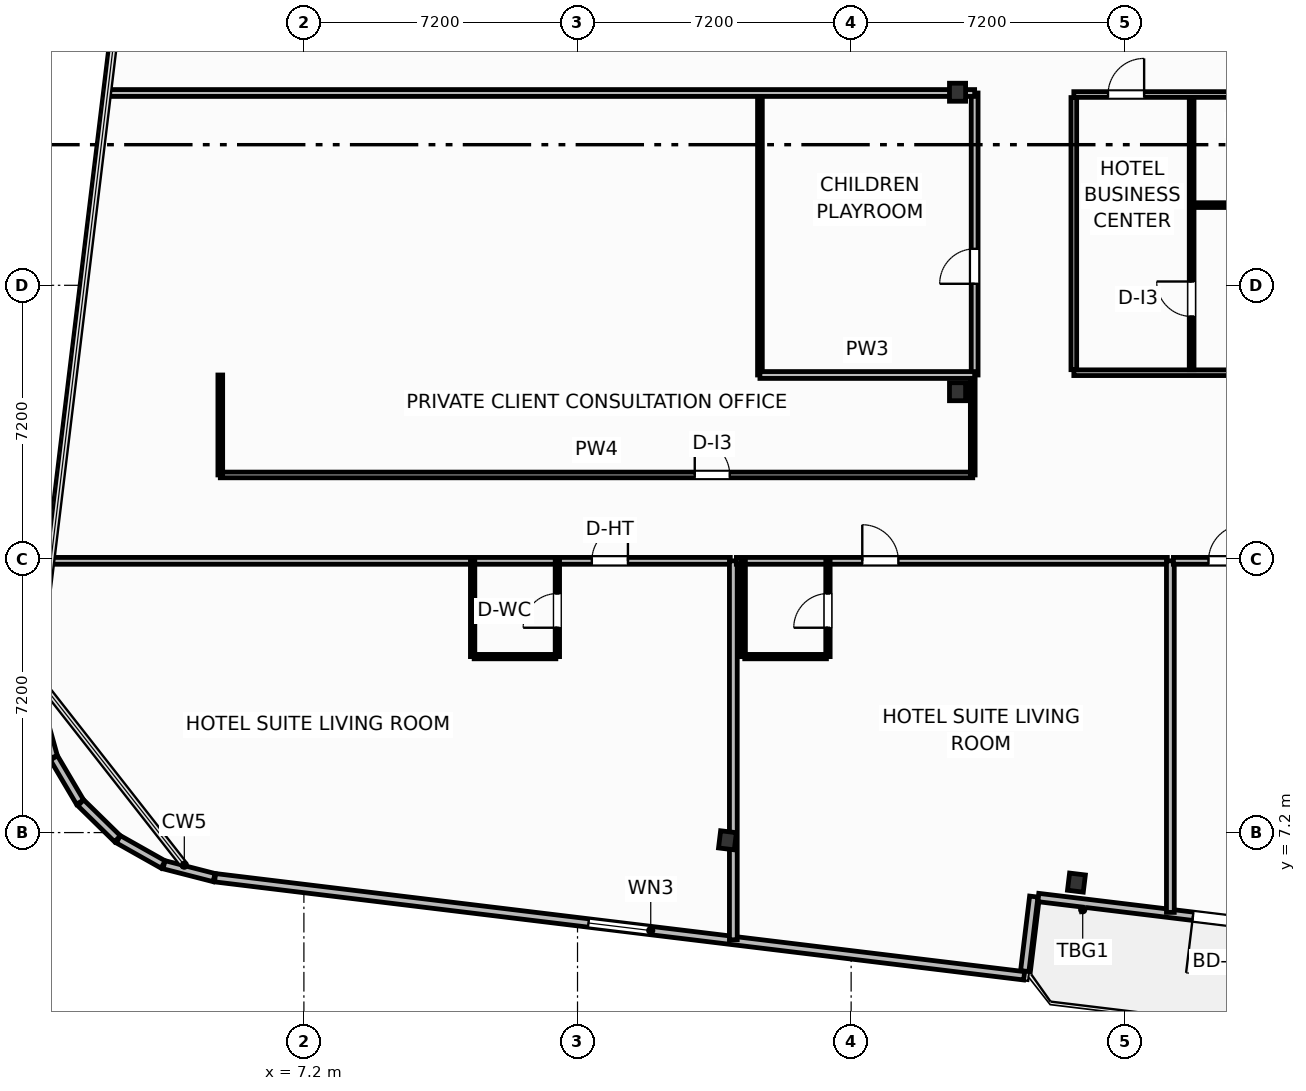
"""IFC4 building model, lengths in metres.
Left out: names, types, materials, properties, quantities, classifications, styles, units other than length and angle.
Written with IfcOpenShell. Run it as: python <this file> out.ifc"""

import sys

from ifc_helpers import new_model, si_unit, direction, frame, frame_2d, origin, origin_2d, place, context, subcontext, project, spatial, rectangle, i_section, extrude, element, fill, save


model = new_model("IFC4")
c1 = context("Model", 3, precision=1e-05, world=origin(), true_north=direction((0.0, 1.0)))
c2 = subcontext(c1, "Body", "Model", "MODEL_VIEW")
j1 = project(units=[si_unit("LENGTHUNIT", "METRE"), si_unit("PLANEANGLEUNIT", "RADIAN")], contexts=[c1])
p1 = place(None, origin())
s1 = spatial("IfcSite", under=j1, at=p1, CompositionType="ELEMENT")
p2 = place(p1, origin())
s2 = spatial("IfcBuilding", under=s1, at=p2, CompositionType="ELEMENT")
p3 = place(p2, frame((0.0, 0.0, 136.5)))
s3 = spatial("IfcBuildingStorey", under=s2, at=p3, CompositionType="ELEMENT", Elevation=136.5)
for number, where, z_axis, x_axis in (
    (1, (24.4, 18.8, 0.0), (0.0, 0.0, 1.0), (1.0, 0.0, 0.0)),
    (2, (24.4, 26.68, 0.0), (0.0, 0.0, 1.0), (1.0, 0.0, 0.0)),
):
    element("IfcColumn", number, at=place(p3, frame(where, z_axis=z_axis, x_axis=x_axis)), inside=s3, PredefinedType="COLUMN", context=c2, shape_type="SweptSolid", body=[
        extrude(i_section(OverallWidth=0.424, OverallDepth=0.474, WebThickness=0.048, FlangeThickness=0.077, FilletRadius=0.025, at=origin_2d()), origin(), (0.0, 0.0, 1.0), 3.7),
    ])
for number, where, z_axis, x_axis in (
    (3, (18.346, 6.997, 0.0), (0.0, 0.0, 1.0), (0.993, -0.12, 0.0)),
    (4, (27.529, 5.884, 0.0), (0.0, 0.0, 1.0), (0.993, -0.12, 0.0)),
):
    element("IfcColumn", number, at=place(p3, frame(where, z_axis=z_axis, x_axis=x_axis)), inside=s3, PredefinedType="COLUMN", context=c2, shape_type="SweptSolid", body=[
        extrude(i_section(OverallWidth=0.418, OverallDepth=0.455, WebThickness=0.042, FlangeThickness=0.068, FilletRadius=0.025, at=origin_2d()), origin(), (0.0, 0.0, 1.0), 3.7),
    ])
p4 = place(p3, frame((32.48, 4.77, 0.0), z_axis=(0.0, 0.0, 1.0), x_axis=(-0.992735402148, 0.120318000826, 0.0)))
e5 = element("IfcWall", 5, at=p4, inside=s3, PredefinedType="SOLIDWALL", context=c2, shape_type="SweptSolid", body=[
    extrude(rectangle(XDim=6.0, YDim=0.22, at=frame_2d((3.0, 0.0))), origin(), (0.0, 0.0, 1.0), 2.73),
])
p5 = place(p4, frame((0.4, 0.0, 0.0)))
e6 = element("IfcOpeningElement", 6, at=p5, cuts=e5, PredefinedType="OPENING", context=c2, shape_type="SweptSolid", body=[
    extrude(rectangle(XDim=1.5, YDim=2.25, at=frame_2d((0.75, 1.125))), frame((0.0, 0.12, 0.0), z_axis=(0.0, -1.0, 0.0), x_axis=(1.0, 0.0, 0.0)), (0.0, 0.0, 1.0), 0.24),
])
p6 = place(p3, frame((0.245, 10.491, 0.0), z_axis=(0.0, 0.0, 1.0), x_axis=(0.268853470153, -0.963181089716, 0.0)))
e7 = element("IfcWall", 7, at=p6, inside=s3, PredefinedType="SOLIDWALL", context=c2, shape_type="SweptSolid", body=[
    extrude(rectangle(XDim=1.353, YDim=0.22, at=frame_2d((0.677, 0.0))), origin(), (0.0, 0.0, 1.0), 2.73),
])
p7 = place(p3, frame((0.622, 9.166, 0.0), z_axis=(0.0, 0.0, 1.0), x_axis=(0.508911700393, -0.860818727261, 0.0)))
e8 = element("IfcWall", 8, at=p7, inside=s3, PredefinedType="SOLIDWALL", context=c2, shape_type="SweptSolid", body=[
    extrude(rectangle(XDim=1.353, YDim=0.22, at=frame_2d((0.676, 0.0))), origin(), (0.0, 0.0, 1.0), 2.73),
])
p8 = place(p3, frame((1.328, 7.984, 0.0), z_axis=(0.0, 0.0, 1.0), x_axis=(0.714376989847, -0.69976104234, 0.0)))
e9 = element("IfcWall", 9, at=p8, inside=s3, PredefinedType="SOLIDWALL", context=c2, shape_type="SweptSolid", body=[
    extrude(rectangle(XDim=1.353, YDim=0.22, at=frame_2d((0.677, 0.0))), origin(), (0.0, 0.0, 1.0), 2.73),
])
p9 = place(p3, frame((2.316, 7.025, 0.0), z_axis=(0.0, 0.0, 1.0), x_axis=(0.87113677592, -0.491040443996, 0.0)))
e10 = element("IfcWall", 10, at=p9, inside=s3, PredefinedType="SOLIDWALL", context=c2, shape_type="SweptSolid", body=[
    extrude(rectangle(XDim=1.353, YDim=0.22, at=frame_2d((0.677, 0.0))), origin(), (0.0, 0.0, 1.0), 2.73),
])
p10 = place(p3, frame((3.519, 6.354, 0.0), z_axis=(0.0, 0.0, 1.0), x_axis=(0.968506529347, -0.248988157573, 0.0)))
e11 = element("IfcWall", 11, at=p10, inside=s3, PredefinedType="SOLIDWALL", context=c2, shape_type="SweptSolid", body=[
    extrude(rectangle(XDim=1.361, YDim=0.22, at=frame_2d((0.681, 0.0))), origin(), (0.0, 0.0, 1.0), 2.73),
])
p11 = place(p3, frame((4.862, 6.012, 0.0), z_axis=(0.0, 0.0, 1.0), x_axis=(0.99273213367, -0.120344965739, 0.0)))
e12 = element("IfcWall", 12, at=p11, inside=s3, PredefinedType="SOLIDWALL", context=c2, shape_type="SweptSolid", body=[
    extrude(rectangle(XDim=21.447, YDim=0.22, at=frame_2d((10.724, 0.0))), origin(), (0.0, 0.0, 1.0), 2.73),
])
p12 = place(p11, frame((9.899, 0.0, 0.8)))
e13 = element("IfcOpeningElement", 13, at=p12, cuts=e12, PredefinedType="OPENING", context=c2, shape_type="SweptSolid", body=[
    extrude(rectangle(XDim=1.65, YDim=1.65, at=frame_2d((0.825, 0.825))), frame((0.0, 0.12, 0.0), z_axis=(0.0, -1.0, 0.0), x_axis=(1.0, 0.0, 0.0)), (0.0, 0.0, 1.0), 0.24),
])
p13 = place(p3, frame((26.168, 3.555, 0.0), z_axis=(0.0, 0.0, 1.0), x_axis=(0.120290754542, 0.992738703976, 0.0)))
e14 = element("IfcWall", 14, at=p13, inside=s3, PredefinedType="SOLIDWALL", context=c2, shape_type="SweptSolid", body=[
    extrude(rectangle(XDim=1.975, YDim=0.22, at=frame_2d((0.987, 0.0))), origin(), (0.0, 0.0, 1.0), 2.73),
])
p14 = place(p3, frame((5.0, 16.61, 0.0), z_axis=(0.0, 0.0, 1.0), x_axis=(1.0, 0.0, 0.0)))
e15 = element("IfcWall", 15, at=p14, inside=s3, PredefinedType="PARTITIONING", context=c2, shape_type="SweptSolid", body=[
    extrude(rectangle(XDim=19.8, YDim=0.15, at=frame_2d((9.9, 0.0))), origin(), (0.0, 0.0, 1.0), 3.45),
])
p15 = place(p14, frame((12.485, 0.0, 0.0)))
e16 = element("IfcOpeningElement", 16, at=p15, cuts=e15, PredefinedType="OPENING", context=c2, shape_type="SweptSolid", body=[
    extrude(rectangle(XDim=0.92, YDim=2.05, at=frame_2d((0.46, 1.025))), frame((0.0, 0.085, 0.0), z_axis=(0.0, -1.0, 0.0), x_axis=(1.0, 0.0, 0.0)), (0.0, 0.0, 1.0), 0.17),
])
p16 = place(p3, frame((5.0, 16.61, 0.0), z_axis=(0.0, 0.0, 1.0), x_axis=(0.0, 1.0, 0.0)))
e17 = element("IfcWall", 17, at=p16, inside=s3, PredefinedType="PARTITIONING", context=c2, shape_type="SweptSolid", body=[
    extrude(rectangle(XDim=2.63, YDim=0.125, at=frame_2d((1.315, 0.0))), origin(), (0.0, 0.0, 1.0), 3.45),
])
p17 = place(p3, frame((24.8, 16.61, 0.0), z_axis=(0.0, 0.0, 1.0), x_axis=(0.0, 1.0, 0.0)))
e18 = element("IfcWall", 18, at=p17, inside=s3, PredefinedType="PARTITIONING", context=c2, shape_type="SweptSolid", body=[
    extrude(rectangle(XDim=2.63, YDim=0.125, at=frame_2d((1.315, 0.0))), origin(), (0.0, 0.0, 1.0), 2.662),
])
p18 = place(p3, frame((0.581, 14.35, 0.0), z_axis=(0.0, 0.0, 1.0), x_axis=(1.0, 0.0, 0.0)))
e19 = element("IfcWall", 19, at=p18, inside=s3, PredefinedType="PARTITIONING", context=c2, shape_type="SweptSolid", body=[
    extrude(rectangle(XDim=17.839, YDim=0.18, at=frame_2d((8.919, 0.0))), origin(), (0.0, 0.0, 1.0), 3.45),
])
p19 = place(p18, frame((14.196, 0.0, 0.0)))
e20 = element("IfcOpeningElement", 20, at=p19, cuts=e19, PredefinedType="OPENING", context=c2, shape_type="SweptSolid", body=[
    extrude(rectangle(XDim=0.95, YDim=2.15, at=frame_2d((0.475, 1.075))), frame((0.0, 0.1, 0.0), z_axis=(0.0, -1.0, 0.0), x_axis=(1.0, 0.0, 0.0)), (0.0, 0.0, 1.0), 0.2),
])
p20 = place(p3, frame((11.68, 11.83, 0.0), z_axis=(0.0, 0.0, 1.0), x_axis=(1.0, 0.0, 0.0)))
e21 = element("IfcWall", 21, at=p20, inside=s3, PredefinedType="PARTITIONING", context=c2, shape_type="SweptSolid", body=[
    extrude(rectangle(XDim=2.15, YDim=0.115, at=frame_2d((1.075, 0.0))), origin(), (0.0, 0.0, 1.0), 3.45),
])
p21 = place(p3, frame((13.87, 11.83, 0.0), z_axis=(0.0, 0.0, 1.0), x_axis=(0.0, 1.0, 0.0)))
e22 = element("IfcWall", 22, at=p21, inside=s3, PredefinedType="PARTITIONING", context=c2, shape_type="SweptSolid", body=[
    extrude(rectangle(XDim=2.52, YDim=0.115, at=frame_2d((1.26, 0.0))), origin(), (0.0, 0.0, 1.0), 3.45),
])
p22 = place(p21, frame((0.76, 0.0, 0.0)))
e23 = element("IfcOpeningElement", 23, at=p22, cuts=e22, PredefinedType="OPENING", context=c2, shape_type="SweptSolid", body=[
    extrude(rectangle(XDim=0.9, YDim=2.05, at=frame_2d((0.45, 1.025))), frame((0.0, 0.067, 0.0), z_axis=(0.0, -1.0, 0.0), x_axis=(1.0, 0.0, 0.0)), (0.0, 0.0, 1.0), 0.135),
])
p23 = place(p3, frame((11.64, 11.83, 0.0), z_axis=(0.0, 0.0, 1.0), x_axis=(0.0, 1.0, 0.0)))
e24 = element("IfcWall", 24, at=p23, inside=s3, PredefinedType="PARTITIONING", context=c2, shape_type="SweptSolid", body=[
    extrude(rectangle(XDim=2.52, YDim=0.115, at=frame_2d((1.26, 0.0))), origin(), (0.0, 0.0, 1.0), 3.45),
])
p24 = place(p3, frame((18.5, 4.379, 0.0), z_axis=(0.0, 0.0, 1.0), x_axis=(0.0, 1.0, 0.0)))
e25 = element("IfcWall", 25, at=p24, inside=s3, PredefinedType="PARTITIONING", context=c2, shape_type="SweptSolid", body=[
    extrude(rectangle(XDim=9.971, YDim=0.205, at=frame_2d((4.985, 0.0))), origin(), (0.0, 0.0, 1.0), 3.45),
])
p25 = place(p3, frame((18.58, 14.35, 0.0), z_axis=(0.0, 0.0, 1.0), x_axis=(1.0, 0.0, 0.0)))
e26 = element("IfcWall", 26, at=p25, inside=s3, PredefinedType="PARTITIONING", context=c2, shape_type="SweptSolid", body=[
    extrude(rectangle(XDim=11.34, YDim=0.18, at=frame_2d((5.67, 0.0))), origin(), (0.0, 0.0, 1.0), 3.45),
])
p26 = place(p25, frame((3.313, 0.0, 0.0)))
e27 = element("IfcOpeningElement", 27, at=p26, cuts=e26, PredefinedType="OPENING", context=c2, shape_type="SweptSolid", body=[
    extrude(rectangle(XDim=0.95, YDim=2.15, at=frame_2d((0.475, 1.075))), frame((0.0, 0.1, 0.0), z_axis=(0.0, -1.0, 0.0), x_axis=(1.0, 0.0, 0.0)), (0.0, 0.0, 1.0), 0.2),
])
p27 = place(p3, frame((18.8, 11.83, 0.0), z_axis=(0.0, 0.0, 1.0), x_axis=(1.0, 0.0, 0.0)))
e28 = element("IfcWall", 28, at=p27, inside=s3, PredefinedType="PARTITIONING", context=c2, shape_type="SweptSolid", body=[
    extrude(rectangle(XDim=2.15, YDim=0.115, at=frame_2d((1.075, 0.0))), origin(), (0.0, 0.0, 1.0), 3.45),
])
p28 = place(p3, frame((20.99, 11.83, 0.0), z_axis=(0.0, 0.0, 1.0), x_axis=(0.0, 1.0, 0.0)))
e29 = element("IfcWall", 29, at=p28, inside=s3, PredefinedType="PARTITIONING", context=c2, shape_type="SweptSolid", body=[
    extrude(rectangle(XDim=2.52, YDim=0.115, at=frame_2d((1.26, 0.0))), origin(), (0.0, 0.0, 1.0), 3.45),
])
p29 = place(p28, frame((0.76, 0.0, 0.0)))
e30 = element("IfcOpeningElement", 30, at=p29, cuts=e29, PredefinedType="OPENING", context=c2, shape_type="SweptSolid", body=[
    extrude(rectangle(XDim=0.9, YDim=2.05, at=frame_2d((0.45, 1.025))), frame((0.0, 0.067, 0.0), z_axis=(0.0, -1.0, 0.0), x_axis=(1.0, 0.0, 0.0)), (0.0, 0.0, 1.0), 0.135),
])
p30 = place(p3, frame((18.76, 11.83, 0.0), z_axis=(0.0, 0.0, 1.0), x_axis=(0.0, 1.0, 0.0)))
e31 = element("IfcWall", 31, at=p30, inside=s3, PredefinedType="PARTITIONING", context=c2, shape_type="SweptSolid", body=[
    extrude(rectangle(XDim=2.52, YDim=0.115, at=frame_2d((1.26, 0.0))), origin(), (0.0, 0.0, 1.0), 3.45),
])
p31 = place(p3, frame((30.0, 5.1, 0.0), z_axis=(0.0, 0.0, 1.0), x_axis=(0.0, 1.0, 0.0)))
e32 = element("IfcWall", 32, at=p31, inside=s3, PredefinedType="PARTITIONING", context=c2, shape_type="SweptSolid", body=[
    extrude(rectangle(XDim=9.25, YDim=0.205, at=frame_2d((4.625, 0.0))), origin(), (0.0, 0.0, 1.0), 3.45),
])
p32 = place(p3, frame((30.08, 14.35, 0.0), z_axis=(0.0, 0.0, 1.0), x_axis=(1.0, 0.0, 0.0)))
e33 = element("IfcWall", 33, at=p32, inside=s3, PredefinedType="PARTITIONING", context=c2, shape_type="SweptSolid", body=[
    extrude(rectangle(XDim=11.34, YDim=0.18, at=frame_2d((5.67, 0.0))), origin(), (0.0, 0.0, 1.0), 3.45),
])
p33 = place(p32, frame((0.923, 0.0, 0.0)))
e34 = element("IfcOpeningElement", 34, at=p33, cuts=e33, PredefinedType="OPENING", context=c2, shape_type="SweptSolid", body=[
    extrude(rectangle(XDim=0.95, YDim=2.15, at=frame_2d((0.475, 1.075))), frame((0.0, 0.1, 0.0), z_axis=(0.0, -1.0, 0.0), x_axis=(1.0, 0.0, 0.0)), (0.0, 0.0, 1.0), 0.2),
])
p34 = place(p3, frame((24.85, 19.24, 0.0), z_axis=(0.0, 0.0, 1.0), x_axis=(0.0, 1.0, 0.0)))
e35 = element("IfcWall", 35, at=p34, inside=s3, PredefinedType="PARTITIONING", context=c2, shape_type="SweptSolid", body=[
    extrude(rectangle(XDim=7.42, YDim=0.18, at=frame_2d((3.71, 0.0))), origin(), (0.0, 0.0, 1.0), 3.45),
])
p35 = place(p34, frame((2.4, 0.0, 0.0)))
e36 = element("IfcOpeningElement", 36, at=p35, cuts=e35, PredefinedType="OPENING", context=c2, shape_type="SweptSolid", body=[
    extrude(rectangle(XDim=0.92, YDim=2.05, at=frame_2d((0.46, 1.025))), frame((0.0, 0.1, 0.0), z_axis=(0.0, -1.0, 0.0), x_axis=(1.0, 0.0, 0.0)), (0.0, 0.0, 1.0), 0.2),
])
p36 = place(p3, frame((19.2, 19.24, 0.0), z_axis=(0.0, 0.0, 1.0), x_axis=(0.0, 1.0, 0.0)))
e37 = element("IfcWall", 37, at=p36, inside=s3, PredefinedType="PARTITIONING", context=c2, shape_type="SweptSolid", body=[
    extrude(rectangle(XDim=7.42, YDim=0.125, at=frame_2d((3.71, 0.0))), origin(), (0.0, 0.0, 1.0), 3.45),
])
p37 = place(p3, frame((19.2, 19.24, 0.0), z_axis=(0.0, 0.0, 1.0), x_axis=(1.0, 0.0, 0.0)))
e38 = element("IfcWall", 38, at=p37, inside=s3, PredefinedType="PARTITIONING", context=c2, shape_type="SweptSolid", body=[
    extrude(rectangle(XDim=5.65, YDim=0.18, at=frame_2d((2.825, 0.0))), origin(), (0.0, 0.0, 1.0), 3.45),
])
p38 = place(p3, frame((2.073, 26.66, 0.0), z_axis=(0.0, 0.0, 1.0), x_axis=(1.0, 0.0, 0.0)))
e39 = element("IfcWall", 39, at=p38, inside=s3, PredefinedType="PARTITIONING", context=c2, shape_type="SweptSolid", body=[
    extrude(rectangle(XDim=22.777, YDim=0.18, at=frame_2d((11.388, 0.0))), origin(), (0.0, 0.0, 1.0), 2.662),
])
p39 = place(p3, frame((27.46, 26.62, 0.0), z_axis=(0.0, 0.0, 1.0), x_axis=(1.0, 0.0, 0.0)))
e40 = element("IfcWall", 40, at=p39, inside=s3, PredefinedType="PARTITIONING", context=c2, shape_type="SweptSolid", body=[
    extrude(rectangle(XDim=6.1, YDim=0.15, at=frame_2d((3.05, 0.0))), origin(), (0.0, 0.0, 1.0), 2.662),
])
p40 = place(p39, frame((0.9, 0.0, 0.0)))
e41 = element("IfcOpeningElement", 41, at=p40, cuts=e40, PredefinedType="OPENING", context=c2, shape_type="SweptSolid", body=[
    extrude(rectangle(XDim=0.95, YDim=2.05, at=frame_2d((0.475, 1.025))), frame((0.0, 0.085, 0.0), z_axis=(0.0, -1.0, 0.0), x_axis=(1.0, 0.0, 0.0)), (0.0, 0.0, 1.0), 0.17),
])
p41 = place(p39, frame((4.303, 0.0, 0.0)))
e42 = element("IfcOpeningElement", 42, at=p41, cuts=e40, PredefinedType="OPENING", context=c2, shape_type="SweptSolid", body=[
    extrude(rectangle(XDim=0.9, YDim=2.05, at=frame_2d((0.45, 1.025))), frame((0.0, 0.085, 0.0), z_axis=(0.0, -1.0, 0.0), x_axis=(1.0, 0.0, 0.0)), (0.0, 0.0, 1.0), 0.17),
])
p42 = place(p3, frame((27.46, 19.3, 0.0), z_axis=(0.0, 0.0, 1.0), x_axis=(1.0, 0.0, 0.0)))
e43 = element("IfcWall", 43, at=p42, inside=s3, PredefinedType="PARTITIONING", context=c2, shape_type="SweptSolid", body=[
    extrude(rectangle(XDim=6.1, YDim=0.15, at=frame_2d((3.05, 0.0))), origin(), (0.0, 0.0, 1.0), 2.662),
])
p43 = place(p3, frame((30.56, 19.38, 0.0), z_axis=(0.0, 0.0, 1.0), x_axis=(0.0, 1.0, 0.0)))
e44 = element("IfcWall", 44, at=p43, inside=s3, PredefinedType="PARTITIONING", context=c2, shape_type="SweptSolid", body=[
    extrude(rectangle(XDim=7.16, YDim=0.125, at=frame_2d((3.58, 0.0))), origin(), (0.0, 0.0, 1.0), 3.45),
])
p44 = place(p43, frame((1.4, 0.0, 0.0)))
e45 = element("IfcOpeningElement", 45, at=p44, cuts=e44, PredefinedType="OPENING", context=c2, shape_type="SweptSolid", body=[
    extrude(rectangle(XDim=0.92, YDim=2.05, at=frame_2d((0.46, 1.025))), frame((0.0, 0.073, 0.0), z_axis=(0.0, -1.0, 0.0), x_axis=(1.0, 0.0, 0.0)), (0.0, 0.0, 1.0), 0.145),
])
p45 = place(p3, frame((30.64, 23.71, 0.0), z_axis=(0.0, 0.0, 1.0), x_axis=(1.0, 0.0, 0.0)))
e46 = element("IfcWall", 46, at=p45, inside=s3, PredefinedType="PARTITIONING", context=c2, shape_type="SweptSolid", body=[
    extrude(rectangle(XDim=2.88, YDim=0.125, at=frame_2d((1.44, 0.0))), origin(), (0.0, 0.0, 1.0), 3.45),
])
p46 = place(p3, frame((27.46, 19.38, 0.0), z_axis=(0.0, 0.0, 1.0), x_axis=(0.0, 1.0, 0.0)))
e47 = element("IfcWall", 47, at=p46, inside=s3, PredefinedType="PARTITIONING", context=c2, shape_type="SweptSolid", body=[
    extrude(rectangle(XDim=7.16, YDim=0.15, at=frame_2d((3.58, 0.0))), origin(), (0.0, 0.0, 1.0), 3.45),
])
p47 = place(p5, origin())
e48 = element("IfcDoor", 48, at=p47, inside=s3, OperationType="SINGLE_SWING_RIGHT", PredefinedType="DOOR", context=c2, shape_type="SweptSolid", body=[
    extrude(rectangle(XDim=1.5, YDim=2.25, at=frame_2d((0.75, 1.125))), frame((0.0, 0.025, 0.0), z_axis=(0.0, -1.0, 0.0), x_axis=(1.0, 0.0, 0.0)), (0.0, 0.0, 1.0), 0.05),
])
fill(e6, e48)
p48 = place(p12, origin())
e49 = element("IfcWindow", 49, at=p48, inside=s3, PartitioningType="SINGLE_PANEL", PredefinedType="WINDOW", context=c2, shape_type="SweptSolid", body=[
    extrude(rectangle(XDim=1.65, YDim=1.65, at=frame_2d((0.825, 0.825))), frame((0.0, 0.03, 0.0), z_axis=(0.0, -1.0, 0.0), x_axis=(1.0, 0.0, 0.0)), (0.0, 0.0, 1.0), 0.06),
])
fill(e13, e49)
p49 = place(p15, origin())
e50 = element("IfcDoor", 50, at=p49, inside=s3, OperationType="SINGLE_SWING_LEFT", PredefinedType="DOOR", context=c2, shape_type="SweptSolid", body=[
    extrude(rectangle(XDim=0.92, YDim=2.05, at=frame_2d((0.46, 1.025))), frame((0.0, 0.025, 0.0), z_axis=(0.0, -1.0, 0.0), x_axis=(1.0, 0.0, 0.0)), (0.0, 0.0, 1.0), 0.05),
])
fill(e16, e50)
p50 = place(p19, origin())
e51 = element("IfcDoor", 51, at=p50, inside=s3, OperationType="SINGLE_SWING_RIGHT", PredefinedType="DOOR", context=c2, shape_type="SweptSolid", body=[
    extrude(rectangle(XDim=0.95, YDim=2.15, at=frame_2d((0.475, 1.075))), frame((0.0, 0.025, 0.0), z_axis=(0.0, -1.0, 0.0), x_axis=(1.0, 0.0, 0.0)), (0.0, 0.0, 1.0), 0.05),
])
fill(e20, e51)
p51 = place(p22, origin())
e52 = element("IfcDoor", 52, at=p51, inside=s3, OperationType="SINGLE_SWING_LEFT", PredefinedType="DOOR", context=c2, shape_type="SweptSolid", body=[
    extrude(rectangle(XDim=0.9, YDim=2.05, at=frame_2d((0.45, 1.025))), frame((0.0, 0.025, 0.0), z_axis=(0.0, -1.0, 0.0), x_axis=(1.0, 0.0, 0.0)), (0.0, 0.0, 1.0), 0.05),
])
fill(e23, e52)
p52 = place(p26, origin())
e53 = element("IfcDoor", 53, at=p52, inside=s3, OperationType="SINGLE_SWING_LEFT", PredefinedType="DOOR", context=c2, shape_type="SweptSolid", body=[
    extrude(rectangle(XDim=0.95, YDim=2.15, at=frame_2d((0.475, 1.075))), frame((0.0, 0.025, 0.0), z_axis=(0.0, -1.0, 0.0), x_axis=(1.0, 0.0, 0.0)), (0.0, 0.0, 1.0), 0.05),
])
fill(e27, e53)
p53 = place(p29, origin())
e54 = element("IfcDoor", 54, at=p53, inside=s3, OperationType="SINGLE_SWING_LEFT", PredefinedType="DOOR", context=c2, shape_type="SweptSolid", body=[
    extrude(rectangle(XDim=0.9, YDim=2.05, at=frame_2d((0.45, 1.025))), frame((0.0, 0.025, 0.0), z_axis=(0.0, -1.0, 0.0), x_axis=(1.0, 0.0, 0.0)), (0.0, 0.0, 1.0), 0.05),
])
fill(e30, e54)
p54 = place(p33, origin())
e55 = element("IfcDoor", 55, at=p54, inside=s3, OperationType="SINGLE_SWING_RIGHT", PredefinedType="DOOR", context=c2, shape_type="SweptSolid", body=[
    extrude(rectangle(XDim=0.95, YDim=2.15, at=frame_2d((0.475, 1.075))), frame((0.0, 0.025, 0.0), z_axis=(0.0, -1.0, 0.0), x_axis=(1.0, 0.0, 0.0)), (0.0, 0.0, 1.0), 0.05),
])
fill(e34, e55)
p55 = place(p35, origin())
e56 = element("IfcDoor", 56, at=p55, inside=s3, OperationType="SINGLE_SWING_LEFT", PredefinedType="DOOR", context=c2, shape_type="SweptSolid", body=[
    extrude(rectangle(XDim=0.92, YDim=2.05, at=frame_2d((0.46, 1.025))), frame((0.0, 0.025, 0.0), z_axis=(0.0, -1.0, 0.0), x_axis=(1.0, 0.0, 0.0)), (0.0, 0.0, 1.0), 0.05),
])
fill(e36, e56)
p56 = place(p40, origin())
e57 = element("IfcDoor", 57, at=p56, inside=s3, OperationType="SINGLE_SWING_RIGHT", PredefinedType="DOOR", context=c2, shape_type="SweptSolid", body=[
    extrude(rectangle(XDim=0.95, YDim=2.05, at=frame_2d((0.475, 1.025))), frame((0.0, 0.025, 0.0), z_axis=(0.0, -1.0, 0.0), x_axis=(1.0, 0.0, 0.0)), (0.0, 0.0, 1.0), 0.05),
])
fill(e41, e57)
p57 = place(p44, origin())
e58 = element("IfcDoor", 58, at=p57, inside=s3, OperationType="SINGLE_SWING_RIGHT", PredefinedType="DOOR", context=c2, shape_type="SweptSolid", body=[
    extrude(rectangle(XDim=0.92, YDim=2.05, at=frame_2d((0.46, 1.025))), frame((0.0, 0.025, 0.0), z_axis=(0.0, -1.0, 0.0), x_axis=(1.0, 0.0, 0.0)), (0.0, 0.0, 1.0), 0.05),
])
fill(e45, e58)
save(model, sys.argv[1])
